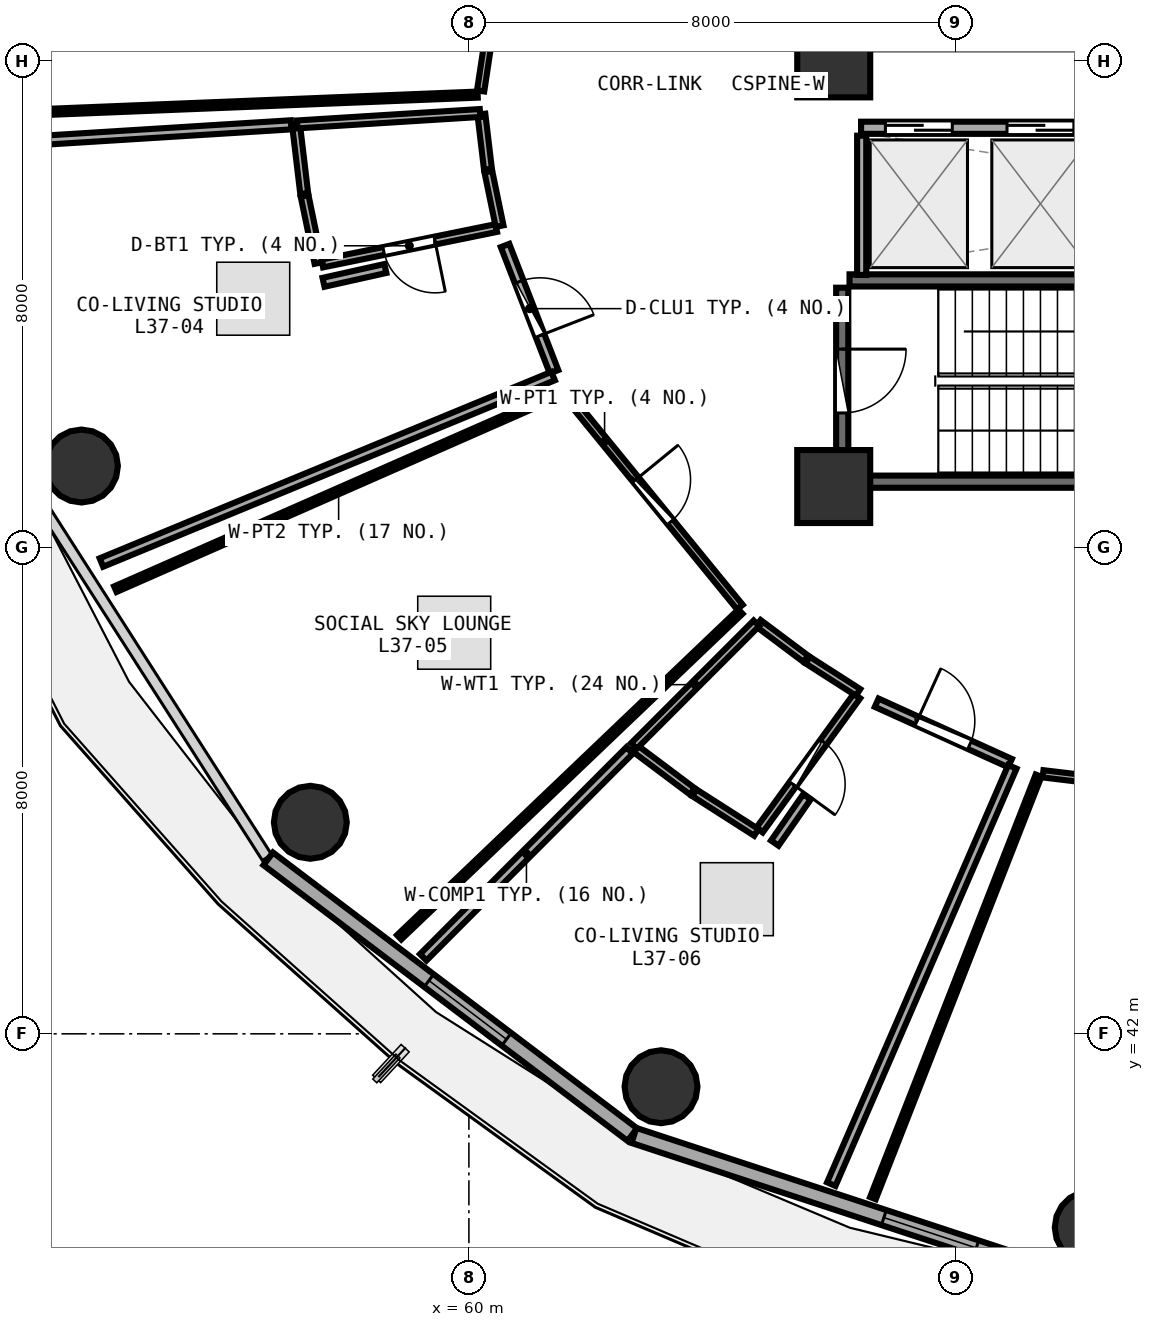
"""IFC4 building model, lengths in metres.
Left out: names, types, materials, properties, quantities, classifications, styles, units other than length and angle.
Written with IfcOpenShell. Run it as: python <this file> out.ifc"""

import sys

from ifc_helpers import new_model, si_unit, direction, frame, frame_2d, origin, origin_2d, place, context, subcontext, project, spatial, rectangle, circle, extrude, element, fill, save


model = new_model("IFC4")
c1 = context("Model", 3, precision=1e-05, world=origin(), true_north=direction((0.0, 1.0)))
c2 = subcontext(c1, "Body", "Model", "MODEL_VIEW")
j1 = project(units=[si_unit("LENGTHUNIT", "METRE"), si_unit("PLANEANGLEUNIT", "RADIAN")], contexts=[c1])
p1 = place(None, origin())
s1 = spatial("IfcSite", under=j1, at=p1, CompositionType="ELEMENT")
p2 = place(p1, origin())
s2 = spatial("IfcBuilding", under=s1, at=p2, CompositionType="ELEMENT")
p3 = place(p2, frame((0.0, 0.0, 146.85)))
s3 = spatial("IfcBuildingStorey", under=s2, at=p3, CompositionType="ELEMENT", Elevation=146.85)
for number, where, z_axis, x_axis in (
    (1, (66.0, 51.0, 0.0), (0.0, 0.0, 1.0), (1.0, 0.0, 0.0)),
    (2, (66.0, 58.0, 0.0), (0.0, 0.0, 1.0), (1.0, 0.0, 0.0)),
):
    element("IfcColumn", number, at=place(p3, frame(where, z_axis=z_axis, x_axis=x_axis)), inside=s3, PredefinedType="PILASTER", context=c2, shape_type="SweptSolid", body=[
        extrude(rectangle(XDim=1.2, YDim=1.2, at=origin_2d()), origin(), (0.0, 0.0, 1.0), 3.75),
    ])
for number, where, z_axis, x_axis in (
    (3, (53.627, 51.337, 0.0), (0.0, 0.0, 1.0), (1.0, 0.0, 0.0)),
    (4, (57.392, 45.479, 0.0), (0.0, 0.0, 1.0), (1.0, 0.0, 0.0)),
    (5, (63.16, 41.13, 0.0), (0.0, 0.0, 1.0), (1.0, 0.0, 0.0)),
    (6, (70.235, 38.816, 0.0), (0.0, 0.0, 1.0), (1.0, 0.0, 0.0)),
):
    element("IfcColumn", number, at=place(p3, frame(where, z_axis=z_axis, x_axis=x_axis)), inside=s3, PredefinedType="COLUMN", context=c2, shape_type="SweptSolid", body=[
        extrude(circle(Radius=0.6, at=origin_2d()), origin(), (0.0, 0.0, 1.0), 3.75),
    ])
p4 = place(p3, frame((56.699, 44.878, 0.0), z_axis=(0.0, 0.0, 1.0), x_axis=(0.797163719609, -0.603763202042, 0.0)))
e7 = element("IfcWall", 7, at=p4, inside=s3, PredefinedType="SOLIDWALL", context=c2, shape_type="SweptSolid", body=[
    extrude(rectangle(XDim=7.512, YDim=0.26, at=frame_2d((3.756, 0.0))), origin(), (0.0, 0.0, 1.0), 3.475),
])
p5 = place(p4, frame((3.316, 0.0, 0.85)))
e8 = element("IfcOpeningElement", 8, at=p5, cuts=e7, PredefinedType="OPENING", context=c2, shape_type="SweptSolid", body=[
    extrude(rectangle(XDim=1.6, YDim=1.45, at=frame_2d((0.8, 0.725))), frame((0.0, 0.14, 0.0), z_axis=(0.0, -1.0, 0.0), x_axis=(1.0, 0.0, 0.0)), (0.0, 0.0, 1.0), 0.28),
])
p6 = place(p3, frame((62.714, 40.328, 0.0), z_axis=(0.0, 0.0, 1.0), x_axis=(0.950038302428, -0.312133343173, 0.0)))
e9 = element("IfcWall", 9, at=p6, inside=s3, PredefinedType="SOLIDWALL", context=c2, shape_type="SweptSolid", body=[
    extrude(rectangle(XDim=7.733, YDim=0.26, at=frame_2d((3.867, 0.0))), origin(), (0.0, 0.0, 1.0), 3.475),
])
p7 = place(p6, frame((4.327, 0.0, 0.85)))
e10 = element("IfcOpeningElement", 10, at=p7, cuts=e9, PredefinedType="OPENING", context=c2, shape_type="SweptSolid", body=[
    extrude(rectangle(XDim=1.6, YDim=1.45, at=frame_2d((0.8, 0.725))), frame((0.0, 0.14, 0.0), z_axis=(0.0, -1.0, 0.0), x_axis=(1.0, 0.0, 0.0)), (0.0, 0.0, 1.0), 0.28),
])
for number, where, z_axis, x_axis in (
    (11, (66.26, 51.08, 0.0), (0.0, 0.0, 1.0), (1.0, 0.0, 0.0)),
    (12, (73.42, 54.39, 0.0), (0.0, 0.0, 1.0), (-1.0, 0.0, 0.0)),
):
    element("IfcWall", number, at=place(p3, frame(where, z_axis=z_axis, x_axis=x_axis)), inside=s3, PredefinedType="SHEAR", context=c2, shape_type="SweptSolid", body=[
        extrude(rectangle(XDim=7.16, YDim=0.2, at=frame_2d((3.58, 0.0))), origin(), (0.0, 0.0, 1.0), 3.49),
    ])
p8 = place(p3, frame((66.14, 54.27, 0.0), z_axis=(0.0, 0.0, 1.0), x_axis=(0.0, -1.0, 0.0)))
e13 = element("IfcWall", 13, at=p8, inside=s3, PredefinedType="SHEAR", context=c2, shape_type="SweptSolid", body=[
    extrude(rectangle(XDim=3.07, YDim=0.2, at=frame_2d((1.535, 0.0))), origin(), (0.0, 0.0, 1.0), 3.49),
])
p9 = place(p8, frame((1.01, 0.0, 0.0)))
e14 = element("IfcOpeningElement", 14, at=p9, cuts=e13, PredefinedType="OPENING", context=c2, shape_type="SweptSolid", body=[
    extrude(rectangle(XDim=1.05, YDim=2.1, at=frame_2d((0.525, 1.05))), frame((0.0, 0.11, 0.0), z_axis=(0.0, -1.0, 0.0), x_axis=(1.0, 0.0, 0.0)), (0.0, 0.0, 1.0), 0.22),
])
p10 = place(p3, frame((66.45, 56.9, 0.0), z_axis=(0.0, 0.0, 1.0), x_axis=(1.0, 0.0, 0.0)))
e15 = element("IfcWall", 15, at=p10, inside=s3, PredefinedType="SOLIDWALL", context=c2, shape_type="SweptSolid", body=[
    extrude(rectangle(XDim=14.4, YDim=0.2, at=frame_2d((7.2, 0.0))), origin(), (0.0, 0.0, 1.0), 3.48),
])
p11 = place(p10, frame((0.4, 0.0, 0.0)))
e16 = element("IfcOpeningElement", 16, at=p11, cuts=e15, PredefinedType="OPENING", context=c2, shape_type="SweptSolid", body=[
    extrude(rectangle(XDim=1.1, YDim=2.1, at=frame_2d((0.55, 1.05))), frame((0.0, 0.11, 0.0), z_axis=(0.0, -1.0, 0.0), x_axis=(1.0, 0.0, 0.0)), (0.0, 0.0, 1.0), 0.22),
])
p12 = place(p10, frame((2.4, 0.0, 0.0)))
e17 = element("IfcOpeningElement", 17, at=p12, cuts=e15, PredefinedType="OPENING", context=c2, shape_type="SweptSolid", body=[
    extrude(rectangle(XDim=1.1, YDim=2.1, at=frame_2d((0.55, 1.05))), frame((0.0, 0.11, 0.0), z_axis=(0.0, -1.0, 0.0), x_axis=(1.0, 0.0, 0.0)), (0.0, 0.0, 1.0), 0.22),
])
p13 = place(p10, frame((4.4, 0.0, 0.0)))
e18 = element("IfcOpeningElement", 18, at=p13, cuts=e15, PredefinedType="OPENING", context=c2, shape_type="SweptSolid", body=[
    extrude(rectangle(XDim=1.1, YDim=2.1, at=frame_2d((0.55, 1.05))), frame((0.0, 0.11, 0.0), z_axis=(0.0, -1.0, 0.0), x_axis=(1.0, 0.0, 0.0)), (0.0, 0.0, 1.0), 0.22),
])
p14 = place(p3, frame((66.46, 54.48, 0.0), z_axis=(0.0, 0.0, 1.0), x_axis=(0.0, 1.0, 0.0)))
e19 = element("IfcWall", 19, at=p14, inside=s3, PredefinedType="PARTITIONING", context=c2, shape_type="SweptSolid", body=[
    extrude(rectangle(XDim=2.29, YDim=0.15, at=frame_2d((1.145, 0.0))), origin(), (0.0, 0.0, 1.0), 3.48),
])
p15 = place(p3, frame((69.443, 46.276, 0.0), z_axis=(0.0, 0.0, 1.0), x_axis=(0.992874348748, -0.119165966612, 0.0)))
e20 = element("IfcWall", 20, at=p15, inside=s3, PredefinedType="PARTITIONING", context=c2, shape_type="SweptSolid", body=[
    extrude(rectangle(XDim=5.569, YDim=0.12, at=frame_2d((2.784, 0.0))), origin(), (0.0, 0.0, 1.0), 2.975),
])
p16 = place(p15, frame((2.334, 0.0, 0.0)))
e21 = element("IfcOpeningElement", 21, at=p16, cuts=e20, PredefinedType="OPENING", context=c2, shape_type="SweptSolid", body=[
    extrude(rectangle(XDim=0.9, YDim=2.08, at=frame_2d((0.45, 1.04))), frame((0.0, 0.07, 0.0), z_axis=(0.0, -1.0, 0.0), x_axis=(1.0, 0.0, 0.0)), (0.0, 0.0, 1.0), 0.14),
])
p17 = place(p3, frame((60.843, 61.796, 0.0), z_axis=(0.0, 0.0, 1.0), x_axis=(-0.149807046494, -0.988715251638, 0.0)))
e22 = element("IfcWall", 22, at=p17, inside=s3, PredefinedType="PARTITIONING", context=c2, shape_type="SweptSolid", body=[
    extrude(rectangle(XDim=4.338, YDim=0.12, at=frame_2d((2.169, 0.0))), origin(), (0.0, 0.0, 1.0), 2.975),
])
p18 = place(p17, frame((1.719, 0.0, 0.0)))
e23 = element("IfcOpeningElement", 23, at=p18, cuts=e22, PredefinedType="OPENING", context=c2, shape_type="SweptSolid", body=[
    extrude(rectangle(XDim=0.9, YDim=2.08, at=frame_2d((0.45, 1.04))), frame((0.0, 0.07, 0.0), z_axis=(0.0, -1.0, 0.0), x_axis=(1.0, 0.0, 0.0)), (0.0, 0.0, 1.0), 0.14),
])
p19 = place(p3, frame((60.45, 55.251, 0.0), z_axis=(0.0, 0.0, 1.0), x_axis=(-0.979866857251, -0.199652052484, 0.0)))
e24 = element("IfcWall", 24, at=p19, inside=s3, PredefinedType="PLUMBINGWALL", context=c2, shape_type="SweptSolid", body=[
    extrude(rectangle(XDim=2.92, YDim=0.13, at=frame_2d((1.46, 0.0))), origin(), (0.0, 0.0, 1.0), 3.175),
])
p20 = place(p19, frame((1.03, 0.0, 0.0)))
e25 = element("IfcOpeningElement", 25, at=p20, cuts=e24, PredefinedType="OPENING", context=c2, shape_type="SweptSolid", body=[
    extrude(rectangle(XDim=0.86, YDim=2.05, at=frame_2d((0.43, 1.025))), frame((0.0, 0.075, 0.0), z_axis=(0.0, -1.0, 0.0), x_axis=(1.0, 0.0, 0.0)), (0.0, 0.0, 1.0), 0.15),
])
p21 = place(p3, frame((60.595, 54.964, 0.0), z_axis=(0.0, 0.0, 1.0), x_axis=(0.361769005858, -0.932267765398, 0.0)))
e26 = element("IfcWall", 26, at=p21, inside=s3, PredefinedType="PARTITIONING", context=c2, shape_type="SweptSolid", body=[
    extrude(rectangle(XDim=2.227, YDim=0.15, at=frame_2d((1.114, 0.0))), origin(), (0.0, 0.0, 1.0), 3.235),
])
p22 = place(p21, frame((0.639, 0.0, 0.0)))
e27 = element("IfcOpeningElement", 27, at=p22, cuts=e26, PredefinedType="OPENING", context=c2, shape_type="SweptSolid", body=[
    extrude(rectangle(XDim=0.95, YDim=2.08, at=frame_2d((0.475, 1.04))), frame((0.0, 0.085, 0.0), z_axis=(0.0, -1.0, 0.0), x_axis=(1.0, 0.0, 0.0)), (0.0, 0.0, 1.0), 0.17),
])
p23 = place(p3, frame((61.604, 52.511, 0.0), z_axis=(0.0, 0.0, 1.0), x_axis=(0.632491819148, -0.77456703952, 0.0)))
e28 = element("IfcWall", 28, at=p23, inside=s3, PredefinedType="PARTITIONING", context=c2, shape_type="SweptSolid", body=[
    extrude(rectangle(XDim=4.511, YDim=0.12, at=frame_2d((2.255, 0.0))), origin(), (0.0, 0.0, 1.0), 2.975),
])
p24 = place(p23, frame((1.805, 0.0, 0.0)))
e29 = element("IfcOpeningElement", 29, at=p24, cuts=e28, PredefinedType="OPENING", context=c2, shape_type="SweptSolid", body=[
    extrude(rectangle(XDim=0.9, YDim=2.08, at=frame_2d((0.45, 1.04))), frame((0.0, 0.07, 0.0), z_axis=(0.0, -1.0, 0.0), x_axis=(1.0, 0.0, 0.0)), (0.0, 0.0, 1.0), 0.14),
])
p25 = place(p3, frame((66.383, 47.555, 0.0), z_axis=(0.0, 0.0, 1.0), x_axis=(-0.588001344837, -0.808859949849, 0.0)))
e30 = element("IfcWall", 30, at=p25, inside=s3, PredefinedType="PLUMBINGWALL", context=c2, shape_type="SweptSolid", body=[
    extrude(rectangle(XDim=2.727, YDim=0.13, at=frame_2d((1.364, 0.0))), origin(), (0.0, 0.0, 1.0), 3.235),
])
p26 = place(p25, frame((0.934, 0.0, 0.0)))
e31 = element("IfcOpeningElement", 31, at=p26, cuts=e30, PredefinedType="OPENING", context=c2, shape_type="SweptSolid", body=[
    extrude(rectangle(XDim=0.86, YDim=2.05, at=frame_2d((0.43, 1.025))), frame((0.0, 0.075, 0.0), z_axis=(0.0, -1.0, 0.0), x_axis=(1.0, 0.0, 0.0)), (0.0, 0.0, 1.0), 0.15),
])
p27 = place(p3, frame((66.707, 47.445, 0.0), z_axis=(0.0, 0.0, 1.0), x_axis=(0.910872904928, -0.412686989216, 0.0)))
e32 = element("IfcWall", 32, at=p27, inside=s3, PredefinedType="PARTITIONING", context=c2, shape_type="SweptSolid", body=[
    extrude(rectangle(XDim=2.407, YDim=0.15, at=frame_2d((1.204, 0.0))), origin(), (0.0, 0.0, 1.0), 3.235),
])
p28 = place(p27, frame((0.729, 0.0, 0.0)))
e33 = element("IfcOpeningElement", 33, at=p28, cuts=e32, PredefinedType="OPENING", context=c2, shape_type="SweptSolid", body=[
    extrude(rectangle(XDim=0.95, YDim=2.08, at=frame_2d((0.475, 1.04))), frame((0.0, 0.085, 0.0), z_axis=(0.0, -1.0, 0.0), x_axis=(1.0, 0.0, 0.0)), (0.0, 0.0, 1.0), 0.17),
])
p29 = place(p3, frame((66.645, 39.297, 0.0), z_axis=(0.0, 0.0, 1.0), x_axis=(0.364957999702, 0.931023983823, 0.0)))
e34 = element("IfcWall", 34, at=p29, inside=s3, PredefinedType="PARTITIONING", context=c2, shape_type="SweptSolid", body=[
    extrude(rectangle(XDim=7.464, YDim=0.1, at=frame_2d((3.732, 0.0))), origin(), (0.0, 0.0, 1.0), 3.025),
])
p30 = place(p3, frame((60.144, 57.445, 0.0), z_axis=(0.0, 0.0, 1.0), x_axis=(-0.99919531507, -0.040108881097, 0.0)))
e35 = element("IfcWall", 35, at=p30, inside=s3, PredefinedType="PARTITIONING", context=c2, shape_type="SweptSolid", body=[
    extrude(rectangle(XDim=8.169, YDim=0.1, at=frame_2d((4.084, 0.0))), origin(), (0.0, 0.0, 1.0), 3.025),
])
p31 = place(p3, frame((60.205, 57.124, 0.0), z_axis=(0.0, 0.0, 1.0), x_axis=(0.118797046487, -0.992918557459, 0.0)))
e36 = element("IfcWall", 36, at=p31, inside=s3, PredefinedType="PLUMBINGWALL", context=c2, shape_type="SweptSolid", body=[
    extrude(rectangle(XDim=0.912, YDim=0.13, at=frame_2d((0.456, 0.0))), origin(), (0.0, 0.0, 1.0), 3.48),
])
p32 = place(p3, frame((60.32, 56.178, 0.0), z_axis=(0.0, 0.0, 1.0), x_axis=(0.202067144879, -0.979371670491, 0.0)))
e37 = element("IfcWall", 37, at=p32, inside=s3, PredefinedType="PLUMBINGWALL", context=c2, shape_type="SweptSolid", body=[
    extrude(rectangle(XDim=0.915, YDim=0.13, at=frame_2d((0.457, 0.0))), origin(), (0.0, 0.0, 1.0), 3.48),
])
p33 = place(p3, frame((57.526, 54.676, 0.0), z_axis=(0.0, 0.0, 1.0), x_axis=(-0.202111317069, 0.979362555703, 0.0)))
e38 = element("IfcWall", 38, at=p33, inside=s3, PredefinedType="PLUMBINGWALL", context=c2, shape_type="SweptSolid", body=[
    extrude(rectangle(XDim=1.127, YDim=0.13, at=frame_2d((0.563, 0.0))), origin(), (0.0, 0.0, 1.0), 3.48),
])
p34 = place(p3, frame((57.292, 55.819, 0.0), z_axis=(0.0, 0.0, 1.0), x_axis=(-0.11846804652, 0.992957865145, 0.0)))
e39 = element("IfcWall", 39, at=p34, inside=s3, PredefinedType="PLUMBINGWALL", context=c2, shape_type="SweptSolid", body=[
    extrude(rectangle(XDim=1.123, YDim=0.13, at=frame_2d((0.562, 0.0))), origin(), (0.0, 0.0, 1.0), 3.48),
])
p35 = place(p3, frame((57.176, 56.955, 0.0), z_axis=(0.0, 0.0, 1.0), x_axis=(0.998056675164, 0.062312704652, 0.0)))
e40 = element("IfcWall", 40, at=p35, inside=s3, PredefinedType="PLUMBINGWALL", context=c2, shape_type="SweptSolid", body=[
    extrude(rectangle(XDim=3.013, YDim=0.13, at=frame_2d((1.506, 0.0))), origin(), (0.0, 0.0, 1.0), 3.175),
])
p36 = place(p3, frame((61.385, 52.817, 0.0), z_axis=(0.0, 0.0, 1.0), x_axis=(-0.924352507704, -0.381539567412, 0.0)))
e41 = element("IfcWall", 41, at=p36, inside=s3, PredefinedType="PARTITIONING", context=c2, shape_type="SweptSolid", body=[
    extrude(rectangle(XDim=8.037, YDim=0.15, at=frame_2d((4.019, 0.0))), origin(), (0.0, 0.0, 1.0), 2.975),
])
p37 = place(p3, frame((52.012, 56.634, 0.0), z_axis=(0.0, 0.0, 1.0), x_axis=(0.998071814667, 0.062069741162, 0.0)))
e42 = element("IfcWall", 42, at=p37, inside=s3, PredefinedType="PARTITIONING", context=c2, shape_type="SweptSolid", body=[
    extrude(rectangle(XDim=5.074, YDim=0.15, at=frame_2d((2.537, 0.0))), origin(), (0.0, 0.0, 1.0), 3.025),
])
p38 = place(p3, frame((57.609, 54.359, 0.0), z_axis=(0.0, 0.0, 1.0), x_axis=(0.97598825513, 0.217823152693, 0.0)))
e43 = element("IfcWall", 43, at=p38, inside=s3, PredefinedType="PARTITIONING", context=c2, shape_type="SweptSolid", body=[
    extrude(rectangle(XDim=1.042, YDim=0.15, at=frame_2d((0.521, 0.0))), origin(), (0.0, 0.0, 1.0), 3.175),
])
p39 = place(p3, frame((64.466, 48.943, 0.0), z_axis=(0.0, 0.0, 1.0), x_axis=(-0.723511266615, -0.690312572014, 0.0)))
e44 = element("IfcWall", 44, at=p39, inside=s3, PredefinedType="PARTITIONING", context=c2, shape_type="SweptSolid", body=[
    extrude(rectangle(XDim=7.758, YDim=0.1, at=frame_2d((3.879, 0.0))), origin(), (0.0, 0.0, 1.0), 3.025),
])
p40 = place(p3, frame((54.186, 49.312, 0.0), z_axis=(0.0, 0.0, 1.0), x_axis=(0.915373356269, 0.402606034024, 0.0)))
e45 = element("IfcWall", 45, at=p40, inside=s3, PredefinedType="PARTITIONING", context=c2, shape_type="SweptSolid", body=[
    extrude(rectangle(XDim=8.023, YDim=0.1, at=frame_2d((4.011, 0.0))), origin(), (0.0, 0.0, 1.0), 2.975),
])
p41 = place(p3, frame((64.759, 48.753, 0.0), z_axis=(0.0, 0.0, 1.0), x_axis=(0.800390142897, -0.599479456824, 0.0)))
e46 = element("IfcWall", 46, at=p41, inside=s3, PredefinedType="PLUMBINGWALL", context=c2, shape_type="SweptSolid", body=[
    extrude(rectangle(XDim=0.976, YDim=0.13, at=frame_2d((0.488, 0.0))), origin(), (0.0, 0.0, 1.0), 2.975),
])
p42 = place(p3, frame((65.573, 48.145, 0.0), z_axis=(0.0, 0.0, 1.0), x_axis=(0.842104586495, -0.539314254776, 0.0)))
e47 = element("IfcWall", 47, at=p42, inside=s3, PredefinedType="PLUMBINGWALL", context=c2, shape_type="SweptSolid", body=[
    extrude(rectangle(XDim=0.984, YDim=0.13, at=frame_2d((0.492, 0.0))), origin(), (0.0, 0.0, 1.0), 3.48),
])
p43 = place(p3, frame((64.727, 45.312, 0.0), z_axis=(0.0, 0.0, 1.0), x_axis=(-0.842330007588, 0.538962112135, 0.0)))
e48 = element("IfcWall", 48, at=p43, inside=s3, PredefinedType="PLUMBINGWALL", context=c2, shape_type="SweptSolid", body=[
    extrude(rectangle(XDim=1.21, YDim=0.13, at=frame_2d((0.605, 0.0))), origin(), (0.0, 0.0, 1.0), 2.975),
])
p44 = place(p3, frame((63.675, 45.987, 0.0), z_axis=(0.0, 0.0, 1.0), x_axis=(-0.8, 0.6, 0.0)))
e49 = element("IfcWall", 49, at=p44, inside=s3, PredefinedType="PLUMBINGWALL", context=c2, shape_type="SweptSolid", body=[
    extrude(rectangle(XDim=1.2, YDim=0.13, at=frame_2d((0.6, 0.0))), origin(), (0.0, 0.0, 1.0), 3.48),
])
p45 = place(p3, frame((62.713, 46.733, 0.0), z_axis=(0.0, 0.0, 1.0), x_axis=(0.706764315195, 0.707449081396, 0.0)))
e50 = element("IfcWall", 50, at=p45, inside=s3, PredefinedType="PLUMBINGWALL", context=c2, shape_type="SweptSolid", body=[
    extrude(rectangle(XDim=2.852, YDim=0.13, at=frame_2d((1.426, 0.0))), origin(), (0.0, 0.0, 1.0), 3.235),
])
p46 = place(p3, frame((68.938, 46.39, 0.0), z_axis=(0.0, 0.0, 1.0), x_axis=(-0.398074464123, -0.917353105959, 0.0)))
e51 = element("IfcWall", 51, at=p46, inside=s3, PredefinedType="PARTITIONING", context=c2, shape_type="SweptSolid", body=[
    extrude(rectangle(XDim=7.481, YDim=0.15, at=frame_2d((3.741, 0.0))), origin(), (0.0, 0.0, 1.0), 3.025),
])
p47 = place(p3, frame((59.249, 43.258, 0.0), z_axis=(0.0, 0.0, 1.0), x_axis=(0.706293548202, 0.707919079958, 0.0)))
e52 = element("IfcWall", 52, at=p47, inside=s3, PredefinedType="PARTITIONING", context=c2, shape_type="SweptSolid", body=[
    extrude(rectangle(XDim=4.806, YDim=0.15, at=frame_2d((2.403, 0.0))), origin(), (0.0, 0.0, 1.0), 3.025),
])
p48 = place(p3, frame((65.031, 45.136, 0.0), z_axis=(0.0, 0.0, 1.0), x_axis=(0.570563407037, 0.821253553143, 0.0)))
e53 = element("IfcWall", 53, at=p48, inside=s3, PredefinedType="PARTITIONING", context=c2, shape_type="SweptSolid", body=[
    extrude(rectangle(XDim=0.928, YDim=0.15, at=frame_2d((0.464, 0.0))), origin(), (0.0, 0.0, 1.0), 3.48),
])
p49 = place(p5, origin())
e54 = element("IfcWindow", 54, at=p49, inside=s3, PartitioningType="SINGLE_PANEL", PredefinedType="WINDOW", context=c2, shape_type="SweptSolid", body=[
    extrude(rectangle(XDim=1.6, YDim=1.45, at=frame_2d((0.8, 0.725))), frame((0.0, 0.03, 0.0), z_axis=(0.0, -1.0, 0.0), x_axis=(1.0, 0.0, 0.0)), (0.0, 0.0, 1.0), 0.06),
])
fill(e8, e54)
p50 = place(p7, origin())
e55 = element("IfcWindow", 55, at=p50, inside=s3, PartitioningType="SINGLE_PANEL", PredefinedType="WINDOW", context=c2, shape_type="SweptSolid", body=[
    extrude(rectangle(XDim=1.6, YDim=1.45, at=frame_2d((0.8, 0.725))), frame((0.0, 0.03, 0.0), z_axis=(0.0, -1.0, 0.0), x_axis=(1.0, 0.0, 0.0)), (0.0, 0.0, 1.0), 0.06),
])
fill(e10, e55)
p51 = place(p9, origin())
e56 = element("IfcDoor", 56, at=p51, inside=s3, OperationType="SINGLE_SWING_LEFT", PredefinedType="DOOR", context=c2, shape_type="SweptSolid", body=[
    extrude(rectangle(XDim=1.05, YDim=2.1, at=frame_2d((0.525, 1.05))), frame((0.0, 0.025, 0.0), z_axis=(0.0, -1.0, 0.0), x_axis=(1.0, 0.0, 0.0)), (0.0, 0.0, 1.0), 0.05),
])
fill(e14, e56)
p52 = place(p11, origin())
e57 = element("IfcDoor", 57, at=p52, inside=s3, OperationType="DOUBLE_DOOR_SLIDING", PredefinedType="DOOR", context=c2, shape_type="SweptSolid", body=[
    extrude(rectangle(XDim=1.1, YDim=2.1, at=frame_2d((0.55, 1.05))), frame((0.0, 0.025, 0.0), z_axis=(0.0, -1.0, 0.0), x_axis=(1.0, 0.0, 0.0)), (0.0, 0.0, 1.0), 0.05),
])
fill(e16, e57)
p53 = place(p12, origin())
e58 = element("IfcDoor", 58, at=p53, inside=s3, OperationType="DOUBLE_DOOR_SLIDING", PredefinedType="DOOR", context=c2, shape_type="SweptSolid", body=[
    extrude(rectangle(XDim=1.1, YDim=2.1, at=frame_2d((0.55, 1.05))), frame((0.0, 0.025, 0.0), z_axis=(0.0, -1.0, 0.0), x_axis=(1.0, 0.0, 0.0)), (0.0, 0.0, 1.0), 0.05),
])
fill(e17, e58)
p54 = place(p20, origin())
e59 = element("IfcDoor", 59, at=p54, inside=s3, OperationType="SINGLE_SWING_LEFT", PredefinedType="DOOR", context=c2, shape_type="SweptSolid", body=[
    extrude(rectangle(XDim=0.86, YDim=2.05, at=frame_2d((0.43, 1.025))), frame((0.0, 0.025, 0.0), z_axis=(0.0, -1.0, 0.0), x_axis=(1.0, 0.0, 0.0)), (0.0, 0.0, 1.0), 0.05),
])
fill(e25, e59)
p55 = place(p22, origin())
e60 = element("IfcDoor", 60, at=p55, inside=s3, OperationType="SINGLE_SWING_RIGHT", PredefinedType="DOOR", context=c2, shape_type="SweptSolid", body=[
    extrude(rectangle(XDim=0.95, YDim=2.08, at=frame_2d((0.475, 1.04))), frame((0.0, 0.025, 0.0), z_axis=(0.0, -1.0, 0.0), x_axis=(1.0, 0.0, 0.0)), (0.0, 0.0, 1.0), 0.05),
])
fill(e27, e60)
p56 = place(p24, origin())
e61 = element("IfcDoor", 61, at=p56, inside=s3, OperationType="SINGLE_SWING_LEFT", PredefinedType="DOOR", context=c2, shape_type="SweptSolid", body=[
    extrude(rectangle(XDim=0.9, YDim=2.08, at=frame_2d((0.45, 1.04))), frame((0.0, 0.025, 0.0), z_axis=(0.0, -1.0, 0.0), x_axis=(1.0, 0.0, 0.0)), (0.0, 0.0, 1.0), 0.05),
])
fill(e29, e61)
p57 = place(p26, origin())
e62 = element("IfcDoor", 62, at=p57, inside=s3, OperationType="SINGLE_SWING_RIGHT", PredefinedType="DOOR", context=c2, shape_type="SweptSolid", body=[
    extrude(rectangle(XDim=0.86, YDim=2.05, at=frame_2d((0.43, 1.025))), frame((0.0, 0.025, 0.0), z_axis=(0.0, -1.0, 0.0), x_axis=(1.0, 0.0, 0.0)), (0.0, 0.0, 1.0), 0.05),
])
fill(e31, e62)
p58 = place(p28, origin())
e63 = element("IfcDoor", 63, at=p58, inside=s3, OperationType="SINGLE_SWING_LEFT", PredefinedType="DOOR", context=c2, shape_type="SweptSolid", body=[
    extrude(rectangle(XDim=0.95, YDim=2.08, at=frame_2d((0.475, 1.04))), frame((0.0, 0.025, 0.0), z_axis=(0.0, -1.0, 0.0), x_axis=(1.0, 0.0, 0.0)), (0.0, 0.0, 1.0), 0.05),
])
fill(e33, e63)
save(model, sys.argv[1])
